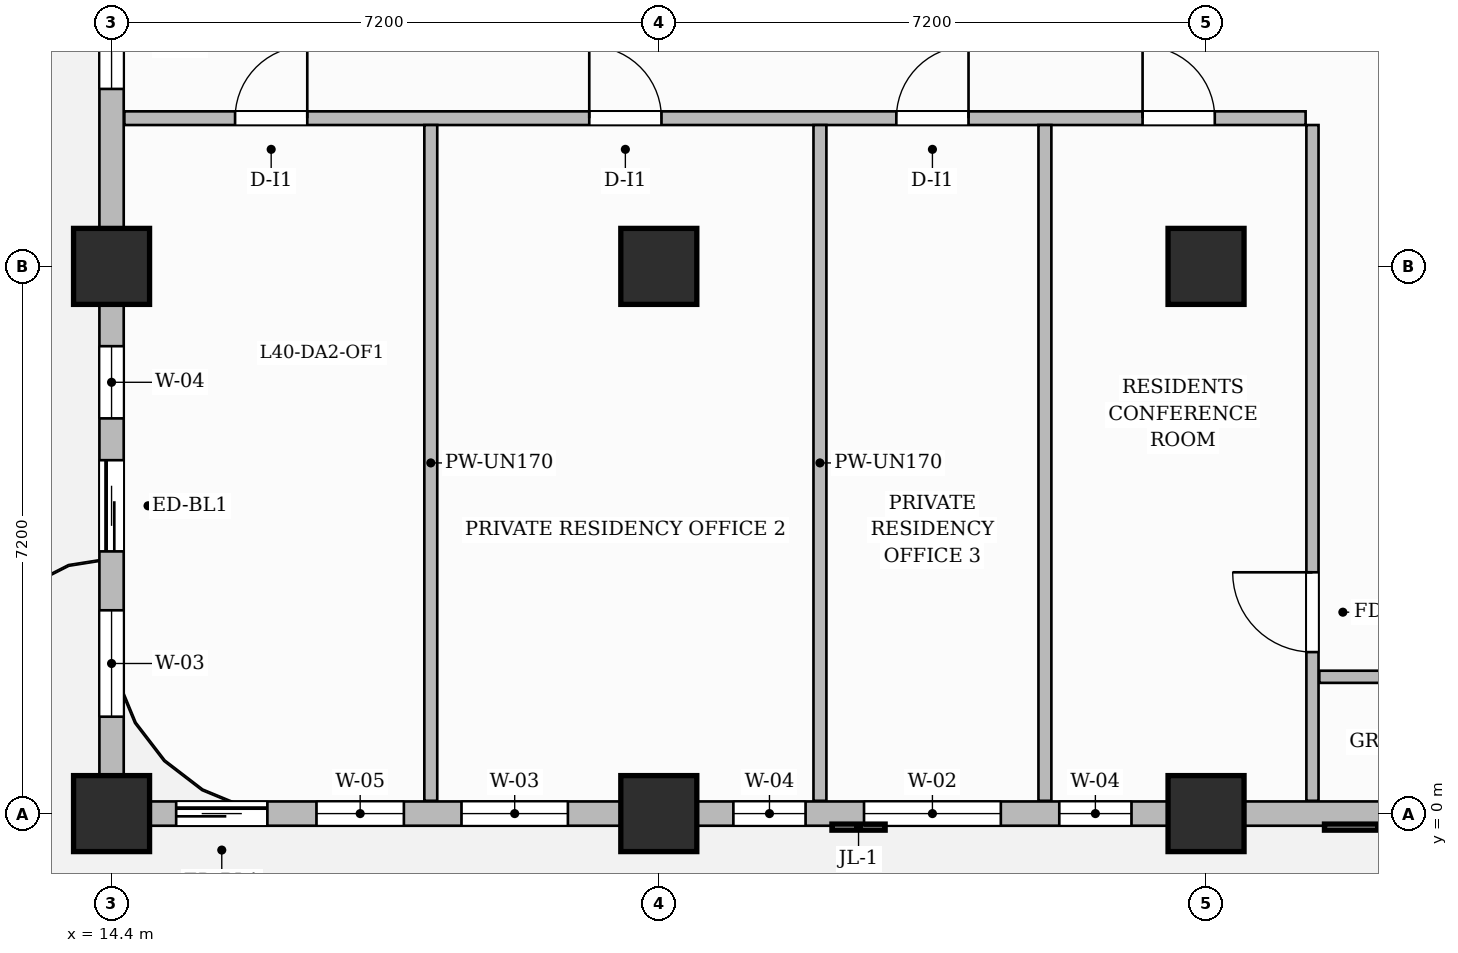
"""IFC4 building model, lengths in metres.
Left out: names, types, materials, properties, quantities, classifications, styles, units other than length and angle.
Written with IfcOpenShell. Run it as: python <this file> out.ifc"""

import sys

from ifc_helpers import new_model, si_unit, direction, frame, frame_2d, origin, origin_2d, place, context, subcontext, project, spatial, rectangle, extrude, source, transform, mapped, element, fill, save


model = new_model("IFC4")
c1 = context("Model", 3, precision=1e-05, world=origin(), true_north=direction((0.0, 1.0)))
c2 = subcontext(c1, "Body", "Model", "MODEL_VIEW")
j1 = project(units=[si_unit("LENGTHUNIT", "METRE"), si_unit("PLANEANGLEUNIT", "RADIAN")], contexts=[c1])
p1 = place(None, origin())
s1 = spatial("IfcSite", under=j1, at=p1, CompositionType="ELEMENT")
p2 = place(p1, origin())
s2 = spatial("IfcBuilding", under=s1, at=p2, CompositionType="ELEMENT")
p3 = place(p2, frame((0.0, 0.0, 161.85)))
s3 = spatial("IfcBuildingStorey", under=s2, at=p3, CompositionType="ELEMENT", Elevation=161.85)
m1 = source(origin(), c2, "Body", "SweptSolid", [
    extrude(rectangle(XDim=1.0, YDim=1.0, at=origin_2d()), origin(), (0.0, 0.0, 1.0), 3.85),
])
for number, where, z_axis, x_axis in (
    (1, (14.4, 0.0, 0.0), (0.0, 0.0, 1.0), (1.0, 0.0, 0.0)),
    (2, (14.4, 7.2, 0.0), (0.0, 0.0, 1.0), (1.0, 0.0, 0.0)),
    (3, (21.6, 0.0, 0.0), (0.0, 0.0, 1.0), (1.0, 0.0, 0.0)),
    (4, (21.6, 7.2, 0.0), (0.0, 0.0, 1.0), (1.0, 0.0, 0.0)),
    (5, (28.8, 0.0, 0.0), (0.0, 0.0, 1.0), (1.0, 0.0, 0.0)),
    (6, (28.8, 7.2, 0.0), (0.0, 0.0, 1.0), (1.0, 0.0, 0.0)),
):
    element("IfcColumn", number, at=place(p3, frame(where, z_axis=z_axis, x_axis=x_axis)), inside=s3, PredefinedType="COLUMN", context=c2, shape_type="MappedRepresentation", body=[
        mapped(m1, transform((0.0, 0.0, 0.0), scale=1.0)),
    ])
p4 = place(p3, frame((14.568, 9.15, 0.0), z_axis=(0.0, 0.0, 1.0), x_axis=(1.0, 0.0, 0.0)))
e7 = element("IfcWall", 7, at=p4, inside=s3, PredefinedType="PARTITIONING", context=c2, shape_type="SweptSolid", body=[
    extrude(rectangle(XDim=15.542, YDim=0.18, at=frame_2d((7.771, 0.0))), origin(), (0.0, 0.0, 1.0), 3.6),
])
p5 = place(p4, frame((1.457, 0.0, 0.0)))
e8 = element("IfcOpeningElement", 8, at=p5, cuts=e7, PredefinedType="OPENING", context=c2, shape_type="SweptSolid", body=[
    extrude(rectangle(XDim=0.95, YDim=2.15, at=frame_2d((0.475, 1.075))), frame((0.0, 0.1, 0.0), z_axis=(0.0, -1.0, 0.0), x_axis=(1.0, 0.0, 0.0)), (0.0, 0.0, 1.0), 0.2),
])
p6 = place(p4, frame((6.117, 0.0, 0.0)))
e9 = element("IfcOpeningElement", 9, at=p6, cuts=e7, PredefinedType="OPENING", context=c2, shape_type="SweptSolid", body=[
    extrude(rectangle(XDim=0.95, YDim=2.15, at=frame_2d((0.475, 1.075))), frame((0.0, 0.1, 0.0), z_axis=(0.0, -1.0, 0.0), x_axis=(1.0, 0.0, 0.0)), (0.0, 0.0, 1.0), 0.2),
])
p7 = place(p4, frame((10.157, 0.0, 0.0)))
e10 = element("IfcOpeningElement", 10, at=p7, cuts=e7, PredefinedType="OPENING", context=c2, shape_type="SweptSolid", body=[
    extrude(rectangle(XDim=0.95, YDim=2.15, at=frame_2d((0.475, 1.075))), frame((0.0, 0.1, 0.0), z_axis=(0.0, -1.0, 0.0), x_axis=(1.0, 0.0, 0.0)), (0.0, 0.0, 1.0), 0.2),
])
p8 = place(p4, frame((13.397, 0.0, 0.0)))
e11 = element("IfcOpeningElement", 11, at=p8, cuts=e7, PredefinedType="OPENING", context=c2, shape_type="SweptSolid", body=[
    extrude(rectangle(XDim=0.95, YDim=2.15, at=frame_2d((0.475, 1.075))), frame((0.0, 0.1, 0.0), z_axis=(0.0, -1.0, 0.0), x_axis=(1.0, 0.0, 0.0)), (0.0, 0.0, 1.0), 0.2),
])
p9 = place(p3, frame((30.2, 0.168, 0.0), z_axis=(0.0, 0.0, 1.0), x_axis=(0.0, 1.0, 0.0)))
e12 = element("IfcWall", 12, at=p9, inside=s3, PredefinedType="PARTITIONING", context=c2, shape_type="SweptSolid", body=[
    extrude(rectangle(XDim=8.892, YDim=0.16, at=frame_2d((4.446, 0.0))), origin(), (0.0, 0.0, 1.0), 3.6),
])
p10 = place(p9, frame((1.957, 0.0, 0.0)))
e13 = element("IfcOpeningElement", 13, at=p10, cuts=e12, PredefinedType="OPENING", context=c2, shape_type="SweptSolid", body=[
    extrude(rectangle(XDim=1.05, YDim=2.15, at=frame_2d((0.525, 1.075))), frame((0.0, 0.09, 0.0), z_axis=(0.0, -1.0, 0.0), x_axis=(1.0, 0.0, 0.0)), (0.0, 0.0, 1.0), 0.18),
])
p11 = place(p3, frame((30.29, 1.8, 0.0), z_axis=(0.0, 0.0, 1.0), x_axis=(1.0, 0.0, 0.0)))
e14 = element("IfcWall", 14, at=p11, inside=s3, PredefinedType="PARTITIONING", context=c2, shape_type="SweptSolid", body=[
    extrude(rectangle(XDim=19.37, YDim=0.16, at=frame_2d((9.685, 0.0))), origin(), (0.0, 0.0, 1.0), 3.6),
])
p12 = place(p11, frame((2.916, 0.0, 0.0)))
e15 = element("IfcOpeningElement", 15, at=p12, cuts=e14, PredefinedType="OPENING", context=c2, shape_type="SweptSolid", body=[
    extrude(rectangle(XDim=0.9, YDim=2.15, at=frame_2d((0.45, 1.075))), frame((0.0, 0.09, 0.0), z_axis=(0.0, -1.0, 0.0), x_axis=(1.0, 0.0, 0.0)), (0.0, 0.0, 1.0), 0.18),
])
p13 = place(p11, frame((9.66, 0.0, 0.0)))
e16 = element("IfcOpeningElement", 16, at=p13, cuts=e14, PredefinedType="OPENING", context=c2, shape_type="SweptSolid", body=[
    extrude(rectangle(XDim=0.9, YDim=2.15, at=frame_2d((0.45, 1.075))), frame((0.0, 0.09, 0.0), z_axis=(0.0, -1.0, 0.0), x_axis=(1.0, 0.0, 0.0)), (0.0, 0.0, 1.0), 0.18),
])
p14 = place(p11, frame((15.86, 0.0, 0.0)))
e17 = element("IfcOpeningElement", 17, at=p14, cuts=e14, PredefinedType="OPENING", context=c2, shape_type="SweptSolid", body=[
    extrude(rectangle(XDim=0.9, YDim=2.15, at=frame_2d((0.45, 1.075))), frame((0.0, 0.09, 0.0), z_axis=(0.0, -1.0, 0.0), x_axis=(1.0, 0.0, 0.0)), (0.0, 0.0, 1.0), 0.18),
])
for number, where, z_axis, x_axis in (
    (18, (18.6, 0.168, 0.0), (0.0, 0.0, 1.0), (0.0, 1.0, 0.0)),
    (19, (23.72, 0.168, 0.0), (0.0, 0.0, 1.0), (0.0, 1.0, 0.0)),
    (20, (26.68, 0.168, 0.0), (0.0, 0.0, 1.0), (0.0, 1.0, 0.0)),
):
    element("IfcWall", number, at=place(p3, frame(where, z_axis=z_axis, x_axis=x_axis)), inside=s3, PredefinedType="PARTITIONING", context=c2, shape_type="SweptSolid", body=[
        extrude(rectangle(XDim=8.892, YDim=0.17, at=frame_2d((4.446, 0.0))), origin(), (0.0, 0.0, 1.0), 3.6),
    ])
p15 = place(p3, frame((14.4, 0.0, 0.0), z_axis=(0.0, 0.0, 1.0), x_axis=(1.0, 0.0, 0.0)))
e21 = element("IfcWall", 21, at=p15, inside=s3, PredefinedType="SOLIDWALL", context=c2, shape_type="SweptSolid", body=[
    extrude(rectangle(XDim=35.4, YDim=0.32, at=frame_2d((17.7, 0.0))), origin(), (0.0, 0.0, 1.0), 3.085),
])
p16 = place(p15, frame((0.85, 0.0, 0.0)))
e22 = element("IfcOpeningElement", 22, at=p16, cuts=e21, PredefinedType="OPENING", context=c2, shape_type="SweptSolid", body=[
    extrude(rectangle(XDim=1.2, YDim=2.2, at=frame_2d((0.6, 1.1))), frame((0.0, 0.17, 0.0), z_axis=(0.0, -1.0, 0.0), x_axis=(1.0, 0.0, 0.0)), (0.0, 0.0, 1.0), 0.34),
])
p17 = place(p15, frame((2.696, 0.0, 0.8)))
e23 = element("IfcOpeningElement", 23, at=p17, cuts=e21, PredefinedType="OPENING", context=c2, shape_type="SweptSolid", body=[
    extrude(rectangle(XDim=1.15, YDim=1.8, at=frame_2d((0.575, 0.9))), frame((0.0, 0.17, 0.0), z_axis=(0.0, -1.0, 0.0), x_axis=(1.0, 0.0, 0.0)), (0.0, 0.0, 1.0), 0.34),
])
p18 = place(p15, frame((4.604, 0.0, 0.8)))
e24 = element("IfcOpeningElement", 24, at=p18, cuts=e21, PredefinedType="OPENING", context=c2, shape_type="SweptSolid", body=[
    extrude(rectangle(XDim=1.4, YDim=1.85, at=frame_2d((0.7, 0.925))), frame((0.0, 0.17, 0.0), z_axis=(0.0, -1.0, 0.0), x_axis=(1.0, 0.0, 0.0)), (0.0, 0.0, 1.0), 0.34),
])
p19 = place(p15, frame((8.181, 0.0, 0.8)))
e25 = element("IfcOpeningElement", 25, at=p19, cuts=e21, PredefinedType="OPENING", context=c2, shape_type="SweptSolid", body=[
    extrude(rectangle(XDim=0.95, YDim=1.75, at=frame_2d((0.475, 0.875))), frame((0.0, 0.17, 0.0), z_axis=(0.0, -1.0, 0.0), x_axis=(1.0, 0.0, 0.0)), (0.0, 0.0, 1.0), 0.34),
])
p20 = place(p15, frame((9.9, 0.0, 0.8)))
e26 = element("IfcOpeningElement", 26, at=p20, cuts=e21, PredefinedType="OPENING", context=c2, shape_type="SweptSolid", body=[
    extrude(rectangle(XDim=1.8, YDim=1.85, at=frame_2d((0.9, 0.925))), frame((0.0, 0.17, 0.0), z_axis=(0.0, -1.0, 0.0), x_axis=(1.0, 0.0, 0.0)), (0.0, 0.0, 1.0), 0.34),
])
p21 = place(p15, frame((12.469, 0.0, 0.8)))
e27 = element("IfcOpeningElement", 27, at=p21, cuts=e21, PredefinedType="OPENING", context=c2, shape_type="SweptSolid", body=[
    extrude(rectangle(XDim=0.95, YDim=1.75, at=frame_2d((0.475, 0.875))), frame((0.0, 0.17, 0.0), z_axis=(0.0, -1.0, 0.0), x_axis=(1.0, 0.0, 0.0)), (0.0, 0.0, 1.0), 0.34),
])
p22 = place(p15, frame((16.804, 0.0, 0.8)))
e28 = element("IfcOpeningElement", 28, at=p22, cuts=e21, PredefinedType="OPENING", context=c2, shape_type="SweptSolid", body=[
    extrude(rectangle(XDim=1.8, YDim=1.85, at=frame_2d((0.9, 0.925))), frame((0.0, 0.17, 0.0), z_axis=(0.0, -1.0, 0.0), x_axis=(1.0, 0.0, 0.0)), (0.0, 0.0, 1.0), 0.34),
])
p23 = place(p15, frame((21.521, 0.0, 0.8)))
e29 = element("IfcOpeningElement", 29, at=p23, cuts=e21, PredefinedType="OPENING", context=c2, shape_type="SweptSolid", body=[
    extrude(rectangle(XDim=0.95, YDim=1.75, at=frame_2d((0.475, 0.875))), frame((0.0, 0.17, 0.0), z_axis=(0.0, -1.0, 0.0), x_axis=(1.0, 0.0, 0.0)), (0.0, 0.0, 1.0), 0.34),
])
p24 = place(p15, frame((23.904, 0.0, 0.8)))
e30 = element("IfcOpeningElement", 30, at=p24, cuts=e21, PredefinedType="OPENING", context=c2, shape_type="SweptSolid", body=[
    extrude(rectangle(XDim=1.8, YDim=1.85, at=frame_2d((0.9, 0.925))), frame((0.0, 0.17, 0.0), z_axis=(0.0, -1.0, 0.0), x_axis=(1.0, 0.0, 0.0)), (0.0, 0.0, 1.0), 0.34),
])
p25 = place(p15, frame((29.681, 0.0, 0.8)))
e31 = element("IfcOpeningElement", 31, at=p25, cuts=e21, PredefinedType="OPENING", context=c2, shape_type="SweptSolid", body=[
    extrude(rectangle(XDim=1.8, YDim=1.85, at=frame_2d((0.9, 0.925))), frame((0.0, 0.17, 0.0), z_axis=(0.0, -1.0, 0.0), x_axis=(1.0, 0.0, 0.0)), (0.0, 0.0, 1.0), 0.34),
])
p26 = place(p15, frame((32.327, 0.0, 0.8)))
e32 = element("IfcOpeningElement", 32, at=p26, cuts=e21, PredefinedType="OPENING", context=c2, shape_type="SweptSolid", body=[
    extrude(rectangle(XDim=1.8, YDim=1.85, at=frame_2d((0.9, 0.925))), frame((0.0, 0.17, 0.0), z_axis=(0.0, -1.0, 0.0), x_axis=(1.0, 0.0, 0.0)), (0.0, 0.0, 1.0), 0.34),
])
p27 = place(p3, frame((14.4, 0.05, 0.0), z_axis=(0.0, 0.0, 1.0), x_axis=(0.0, 1.0, 0.0)))
e33 = element("IfcWall", 33, at=p27, inside=s3, PredefinedType="SOLIDWALL", context=c2, shape_type="SweptSolid", body=[
    extrude(rectangle(XDim=20.6, YDim=0.32, at=frame_2d((10.3, 0.0))), origin(), (0.0, 0.0, 1.0), 3.085),
])
p28 = place(p27, frame((3.4, 0.0, 0.0)))
e34 = element("IfcOpeningElement", 34, at=p28, cuts=e33, PredefinedType="OPENING", context=c2, shape_type="SweptSolid", body=[
    extrude(rectangle(XDim=1.2, YDim=2.2, at=frame_2d((0.6, 1.1))), frame((0.0, 0.17, 0.0), z_axis=(0.0, -1.0, 0.0), x_axis=(1.0, 0.0, 0.0)), (0.0, 0.0, 1.0), 0.34),
])
p29 = place(p27, frame((1.225, 0.0, 0.8)))
e35 = element("IfcOpeningElement", 35, at=p29, cuts=e33, PredefinedType="OPENING", context=c2, shape_type="SweptSolid", body=[
    extrude(rectangle(XDim=1.4, YDim=1.85, at=frame_2d((0.7, 0.925))), frame((0.0, 0.17, 0.0), z_axis=(0.0, -1.0, 0.0), x_axis=(1.0, 0.0, 0.0)), (0.0, 0.0, 1.0), 0.34),
])
p30 = place(p27, frame((5.15, 0.0, 0.8)))
e36 = element("IfcOpeningElement", 36, at=p30, cuts=e33, PredefinedType="OPENING", context=c2, shape_type="SweptSolid", body=[
    extrude(rectangle(XDim=0.95, YDim=1.75, at=frame_2d((0.475, 0.875))), frame((0.0, 0.17, 0.0), z_axis=(0.0, -1.0, 0.0), x_axis=(1.0, 0.0, 0.0)), (0.0, 0.0, 1.0), 0.34),
])
p31 = place(p27, frame((9.485, 0.0, 0.8)))
e37 = element("IfcOpeningElement", 37, at=p31, cuts=e33, PredefinedType="OPENING", context=c2, shape_type="SweptSolid", body=[
    extrude(rectangle(XDim=1.15, YDim=1.8, at=frame_2d((0.575, 0.9))), frame((0.0, 0.17, 0.0), z_axis=(0.0, -1.0, 0.0), x_axis=(1.0, 0.0, 0.0)), (0.0, 0.0, 1.0), 0.34),
])
p32 = place(p27, frame((11.389, 0.0, 0.8)))
e38 = element("IfcOpeningElement", 38, at=p32, cuts=e33, PredefinedType="OPENING", context=c2, shape_type="SweptSolid", body=[
    extrude(rectangle(XDim=1.8, YDim=1.85, at=frame_2d((0.9, 0.925))), frame((0.0, 0.17, 0.0), z_axis=(0.0, -1.0, 0.0), x_axis=(1.0, 0.0, 0.0)), (0.0, 0.0, 1.0), 0.34),
])
p33 = place(p27, frame((16.79, 0.0, 0.8)))
e39 = element("IfcOpeningElement", 39, at=p33, cuts=e33, PredefinedType="OPENING", context=c2, shape_type="SweptSolid", body=[
    extrude(rectangle(XDim=1.8, YDim=1.85, at=frame_2d((0.9, 0.925))), frame((0.0, 0.17, 0.0), z_axis=(0.0, -1.0, 0.0), x_axis=(1.0, 0.0, 0.0)), (0.0, 0.0, 1.0), 0.34),
])
m2 = source(origin(), c2, "Body", "SweptSolid", [
    extrude(rectangle(XDim=1.05, YDim=2.15, at=frame_2d((0.525, 1.075))), frame((0.0, 0.025, 0.0), z_axis=(0.0, -1.0, 0.0), x_axis=(1.0, 0.0, 0.0)), (0.0, 0.0, 1.0), 0.05),
])
p34 = place(p10, origin())
e40 = element("IfcDoor", 40, at=p34, inside=s3, OperationType="SINGLE_SWING_RIGHT", PredefinedType="DOOR", context=c2, shape_type="MappedRepresentation", body=[
    mapped(m2, transform((0.0, 0.0, 0.0), scale=1.0)),
])
fill(e13, e40)
m3 = source(origin(), c2, "Body", "SweptSolid", [
    extrude(rectangle(XDim=0.95, YDim=2.15, at=frame_2d((0.475, 1.075))), frame((0.0, 0.025, 0.0), z_axis=(0.0, -1.0, 0.0), x_axis=(1.0, 0.0, 0.0)), (0.0, 0.0, 1.0), 0.05),
])
p35 = place(p5, origin())
e41 = element("IfcDoor", 41, at=p35, inside=s3, OperationType="SINGLE_SWING_RIGHT", PredefinedType="DOOR", context=c2, shape_type="MappedRepresentation", body=[
    mapped(m3, transform((0.0, 0.0, 0.0), scale=1.0)),
])
fill(e8, e41)
p36 = place(p6, origin())
e42 = element("IfcDoor", 42, at=p36, inside=s3, OperationType="SINGLE_SWING_LEFT", PredefinedType="DOOR", context=c2, shape_type="MappedRepresentation", body=[
    mapped(m3, transform((0.0, 0.0, 0.0), scale=1.0)),
])
fill(e9, e42)
p37 = place(p7, origin())
e43 = element("IfcDoor", 43, at=p37, inside=s3, OperationType="SINGLE_SWING_RIGHT", PredefinedType="DOOR", context=c2, shape_type="MappedRepresentation", body=[
    mapped(m3, transform((0.0, 0.0, 0.0), scale=1.0)),
])
fill(e10, e43)
p38 = place(p8, origin())
e44 = element("IfcDoor", 44, at=p38, inside=s3, OperationType="SINGLE_SWING_LEFT", PredefinedType="DOOR", context=c2, shape_type="MappedRepresentation", body=[
    mapped(m3, transform((0.0, 0.0, 0.0), scale=1.0)),
])
fill(e11, e44)
m4 = source(origin(), c2, "Body", "SweptSolid", [
    extrude(rectangle(XDim=1.2, YDim=2.2, at=frame_2d((0.6, 1.1))), frame((0.0, 0.025, 0.0), z_axis=(0.0, -1.0, 0.0), x_axis=(1.0, 0.0, 0.0)), (0.0, 0.0, 1.0), 0.05),
])
p39 = place(p16, origin())
e45 = element("IfcDoor", 45, at=p39, inside=s3, OperationType="SLIDING_TO_LEFT", PredefinedType="DOOR", context=c2, shape_type="MappedRepresentation", body=[
    mapped(m4, transform((0.0, 0.0, 0.0), scale=1.0)),
])
fill(e22, e45)
p40 = place(p28, origin())
e46 = element("IfcDoor", 46, at=p40, inside=s3, OperationType="SLIDING_TO_LEFT", PredefinedType="DOOR", context=c2, shape_type="MappedRepresentation", body=[
    mapped(m4, transform((0.0, 0.0, 0.0), scale=1.0)),
])
fill(e34, e46)
m5 = source(origin(), c2, "Body", "SweptSolid", [
    extrude(rectangle(XDim=1.15, YDim=1.8, at=frame_2d((0.575, 0.9))), frame((0.0, 0.03, 0.0), z_axis=(0.0, -1.0, 0.0), x_axis=(1.0, 0.0, 0.0)), (0.0, 0.0, 1.0), 0.06),
])
p41 = place(p17, origin())
e47 = element("IfcWindow", 47, at=p41, inside=s3, PartitioningType="SINGLE_PANEL", PredefinedType="WINDOW", context=c2, shape_type="MappedRepresentation", body=[
    mapped(m5, transform((0.0, 0.0, 0.0), scale=1.0)),
])
fill(e23, e47)
m6 = source(origin(), c2, "Body", "SweptSolid", [
    extrude(rectangle(XDim=1.4, YDim=1.85, at=frame_2d((0.7, 0.925))), frame((0.0, 0.03, 0.0), z_axis=(0.0, -1.0, 0.0), x_axis=(1.0, 0.0, 0.0)), (0.0, 0.0, 1.0), 0.06),
])
p42 = place(p18, origin())
e48 = element("IfcWindow", 48, at=p42, inside=s3, PartitioningType="SINGLE_PANEL", PredefinedType="WINDOW", context=c2, shape_type="MappedRepresentation", body=[
    mapped(m6, transform((0.0, 0.0, 0.0), scale=1.0)),
])
fill(e24, e48)
m7 = source(origin(), c2, "Body", "SweptSolid", [
    extrude(rectangle(XDim=0.95, YDim=1.75, at=frame_2d((0.475, 0.875))), frame((0.0, 0.03, 0.0), z_axis=(0.0, -1.0, 0.0), x_axis=(1.0, 0.0, 0.0)), (0.0, 0.0, 1.0), 0.06),
])
p43 = place(p19, origin())
e49 = element("IfcWindow", 49, at=p43, inside=s3, PartitioningType="SINGLE_PANEL", PredefinedType="WINDOW", context=c2, shape_type="MappedRepresentation", body=[
    mapped(m7, transform((0.0, 0.0, 0.0), scale=1.0)),
])
fill(e25, e49)
m8 = source(origin(), c2, "Body", "SweptSolid", [
    extrude(rectangle(XDim=1.8, YDim=1.85, at=frame_2d((0.9, 0.925))), frame((0.0, 0.03, 0.0), z_axis=(0.0, -1.0, 0.0), x_axis=(1.0, 0.0, 0.0)), (0.0, 0.0, 1.0), 0.06),
])
p44 = place(p20, origin())
e50 = element("IfcWindow", 50, at=p44, inside=s3, PartitioningType="DOUBLE_PANEL_VERTICAL", PredefinedType="WINDOW", context=c2, shape_type="MappedRepresentation", body=[
    mapped(m8, transform((0.0, 0.0, 0.0), scale=1.0)),
])
fill(e26, e50)
p45 = place(p21, origin())
e51 = element("IfcWindow", 51, at=p45, inside=s3, PartitioningType="SINGLE_PANEL", PredefinedType="WINDOW", context=c2, shape_type="MappedRepresentation", body=[
    mapped(m7, transform((0.0, 0.0, 0.0), scale=1.0)),
])
fill(e27, e51)
p46 = place(p29, origin())
e52 = element("IfcWindow", 52, at=p46, inside=s3, PartitioningType="SINGLE_PANEL", PredefinedType="WINDOW", context=c2, shape_type="MappedRepresentation", body=[
    mapped(m6, transform((0.0, 0.0, 0.0), scale=1.0)),
])
fill(e35, e52)
p47 = place(p30, origin())
e53 = element("IfcWindow", 53, at=p47, inside=s3, PartitioningType="SINGLE_PANEL", PredefinedType="WINDOW", context=c2, shape_type="MappedRepresentation", body=[
    mapped(m7, transform((0.0, 0.0, 0.0), scale=1.0)),
])
fill(e36, e53)
p48 = place(p31, origin())
e54 = element("IfcWindow", 54, at=p48, inside=s3, PartitioningType="SINGLE_PANEL", PredefinedType="WINDOW", context=c2, shape_type="MappedRepresentation", body=[
    mapped(m5, transform((0.0, 0.0, 0.0), scale=1.0)),
])
fill(e37, e54)
save(model, sys.argv[1])
